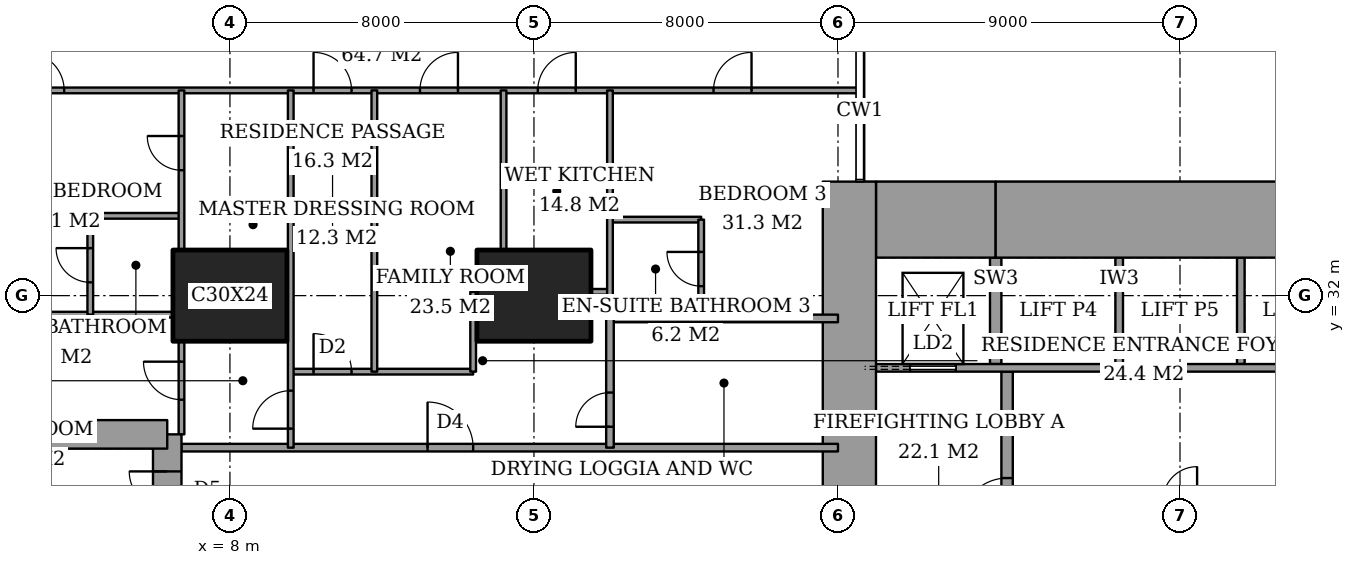
"""IFC4 building model, lengths in metres.
Left out: names, types, materials, properties, quantities, classifications, styles, units other than length and angle.
Written with IfcOpenShell. Run it as: python <this file> out.ifc"""

import sys

from ifc_helpers import new_model, si_unit, direction, frame, frame_2d, origin, origin_2d, place, context, subcontext, project, spatial, rectangle, extrude, element, fill, save


model = new_model("IFC4")
c1 = context("Model", 3, precision=1e-05, world=origin(), true_north=direction((0.0, 1.0)))
c2 = subcontext(c1, "Body", "Model", "MODEL_VIEW")
j1 = project(units=[si_unit("LENGTHUNIT", "METRE"), si_unit("PLANEANGLEUNIT", "RADIAN")], contexts=[c1])
p1 = place(None, origin())
s1 = spatial("IfcSite", under=j1, at=p1, CompositionType="ELEMENT")
p2 = place(p1, origin())
s2 = spatial("IfcBuilding", under=s1, at=p2, CompositionType="ELEMENT")
p3 = place(p2, frame((0.0, 0.0, 58.4)))
s3 = spatial("IfcBuildingStorey", under=s2, at=p3, CompositionType="ELEMENT", Elevation=58.4)
for number, where, z_axis, x_axis in (
    (1, (8.0, 32.0, 0.0), (0.0, 0.0, 1.0), (1.0, 0.0, 0.0)),
    (2, (16.0, 32.0, 0.0), (0.0, 0.0, 1.0), (1.0, 0.0, 0.0)),
):
    element("IfcColumn", number, at=place(p3, frame(where, z_axis=z_axis, x_axis=x_axis)), inside=s3, PredefinedType="COLUMN", context=c2, shape_type="SweptSolid", body=[
        extrude(rectangle(XDim=3.0, YDim=2.4, at=origin_2d()), origin(), (0.0, 0.0, 1.0), 3.6),
    ])
p4 = place(p3, frame((25.0, 34.0, 0.0), z_axis=(0.0, 0.0, 1.0), x_axis=(1.0, 0.0, 0.0)))
e3 = element("IfcWall", 3, at=p4, inside=s3, PredefinedType="SHEAR", context=c2, shape_type="SweptSolid", body=[
    extrude(rectangle(XDim=3.15, YDim=2.0, at=frame_2d((1.575, 0.0))), origin(), (0.0, 0.0, 1.0), 3.6),
])
p5 = place(p3, frame((28.15, 34.0, 0.0), z_axis=(0.0, 0.0, 1.0), x_axis=(1.0, 0.0, 0.0)))
e4 = element("IfcWall", 4, at=p5, inside=s3, PredefinedType="SHEAR", context=c2, shape_type="SweptSolid", body=[
    extrude(rectangle(XDim=9.7, YDim=2.0, at=frame_2d((4.85, 0.0))), origin(), (0.0, 0.0, 1.0), 3.6),
])
p6 = place(p3, frame((24.3, 23.15, 0.0), z_axis=(0.0, 0.0, 1.0), x_axis=(0.0, 1.0, 0.0)))
e5 = element("IfcWall", 5, at=p6, inside=s3, PredefinedType="SHEAR", context=c2, shape_type="SweptSolid", body=[
    extrude(rectangle(XDim=11.85, YDim=1.4, at=frame_2d((5.925, 0.0))), origin(), (0.0, 0.0, 1.0), 3.6),
])
p7 = place(p6, frame((0.75, 0.0, 0.0)))
e6 = element("IfcOpeningElement", 6, at=p7, cuts=e5, PredefinedType="OPENING", context=c2, shape_type="SweptSolid", body=[
    extrude(rectangle(XDim=1.8, YDim=2.4, at=frame_2d((0.9, 1.2))), frame((0.0, 0.71, 0.0), z_axis=(0.0, -1.0, 0.0), x_axis=(1.0, 0.0, 0.0)), (0.0, 0.0, 1.0), 1.42),
])
p8 = place(p3, frame((28.45, 23.3, 0.0), z_axis=(0.0, 0.0, 1.0), x_axis=(0.0, 1.0, 0.0)))
e7 = element("IfcWall", 7, at=p8, inside=s3, PredefinedType="PARTITIONING", context=c2, shape_type="SweptSolid", body=[
    extrude(rectangle(XDim=6.7, YDim=0.3, at=frame_2d((3.35, 0.0))), origin(), (0.0, 0.0, 1.0), 3.6),
])
p9 = place(p8, frame((2.7, 0.0, 0.0)))
e8 = element("IfcOpeningElement", 8, at=p9, cuts=e7, PredefinedType="OPENING", context=c2, shape_type="SweptSolid", body=[
    extrude(rectangle(XDim=1.2, YDim=2.1, at=frame_2d((0.6, 1.05))), frame((0.0, 0.16, 0.0), z_axis=(0.0, -1.0, 0.0), x_axis=(1.0, 0.0, 0.0)), (0.0, 0.0, 1.0), 0.32),
])
p10 = place(p3, frame((6.35, 19.65, 0.0), z_axis=(0.0, 0.0, 1.0), x_axis=(0.0, 1.0, 0.0)))
e9 = element("IfcWall", 9, at=p10, inside=s3, PredefinedType="SHEAR", context=c2, shape_type="SweptSolid", body=[
    extrude(rectangle(XDim=8.7, YDim=0.75, at=frame_2d((4.35, 0.0))), origin(), (0.0, 0.0, 1.0), 3.6),
])
p11 = place(p10, frame((6.725, 0.0, 0.0)))
e10 = element("IfcOpeningElement", 10, at=p11, cuts=e9, PredefinedType="OPENING", context=c2, shape_type="SweptSolid", body=[
    extrude(rectangle(XDim=1.0, YDim=2.1, at=frame_2d((0.5, 1.05))), frame((0.0, 0.385, 0.0), z_axis=(0.0, -1.0, 0.0), x_axis=(1.0, 0.0, 0.0)), (0.0, 0.0, 1.0), 0.77),
])
p12 = place(p3, frame((6.35, 28.35, 0.0), z_axis=(0.0, 0.0, 1.0), x_axis=(-1.0, 0.0, 0.0)))
e11 = element("IfcWall", 11, at=p12, inside=s3, PredefinedType="SHEAR", context=c2, shape_type="SweptSolid", body=[
    extrude(rectangle(XDim=4.45, YDim=0.75, at=frame_2d((2.225, 0.0))), origin(), (0.0, 0.0, 1.0), 3.6),
])
p13 = place(p3, frame((6.725, 28.0, 0.0), z_axis=(0.0, 0.0, 1.0), x_axis=(1.0, 0.0, 0.0)))
e12 = element("IfcWall", 12, at=p13, inside=s3, PredefinedType="PARTITIONING", context=c2, shape_type="SweptSolid", body=[
    extrude(rectangle(XDim=17.275, YDim=0.2, at=frame_2d((8.637, 0.0))), origin(), (0.0, 0.0, 1.0), 3.35),
])
p14 = place(p13, frame((6.475, 0.0, 0.0)))
e13 = element("IfcOpeningElement", 13, at=p14, cuts=e12, PredefinedType="OPENING", context=c2, shape_type="SweptSolid", body=[
    extrude(rectangle(XDim=1.2, YDim=2.4, at=frame_2d((0.6, 1.2))), frame((0.0, 0.11, 0.0), z_axis=(0.0, -1.0, 0.0), x_axis=(1.0, 0.0, 0.0)), (0.0, 0.0, 1.0), 0.22),
])
p15 = place(p3, frame((9.6, 30.0, 0.0), z_axis=(0.0, 0.0, 1.0), x_axis=(1.0, 0.0, 0.0)))
e14 = element("IfcWall", 14, at=p15, inside=s3, PredefinedType="PARTITIONING", context=c2, shape_type="SweptSolid", body=[
    extrude(rectangle(XDim=4.8, YDim=0.15, at=frame_2d((2.4, 0.0))), origin(), (0.0, 0.0, 1.0), 3.35),
])
p16 = place(p15, frame((0.6, 0.0, 0.0)))
e15 = element("IfcOpeningElement", 15, at=p16, cuts=e14, PredefinedType="OPENING", context=c2, shape_type="SweptSolid", body=[
    extrude(rectangle(XDim=1.0, YDim=2.1, at=frame_2d((0.5, 1.05))), frame((0.0, 0.085, 0.0), z_axis=(0.0, -1.0, 0.0), x_axis=(1.0, 0.0, 0.0)), (0.0, 0.0, 1.0), 0.17),
])
p17 = place(p3, frame((18.0, 31.4, 0.0), z_axis=(0.0, 0.0, 1.0), x_axis=(1.0, 0.0, 0.0)))
e16 = element("IfcWall", 16, at=p17, inside=s3, PredefinedType="PARTITIONING", context=c2, shape_type="SweptSolid", body=[
    extrude(rectangle(XDim=6.0, YDim=0.2, at=frame_2d((3.0, 0.0))), origin(), (0.0, 0.0, 1.0), 3.35),
])
p18 = place(p3, frame((1.35, 31.5, 0.0), z_axis=(0.0, 0.0, 1.0), x_axis=(1.0, 0.0, 0.0)))
e17 = element("IfcWall", 17, at=p18, inside=s3, PredefinedType="PARTITIONING", context=c2, shape_type="SweptSolid", body=[
    extrude(rectangle(XDim=5.15, YDim=0.15, at=frame_2d((2.575, 0.0))), origin(), (0.0, 0.0, 1.0), 3.35),
])
p19 = place(p3, frame((17.5, 32.1, 0.0), z_axis=(0.0, 0.0, 1.0), x_axis=(1.0, 0.0, 0.0)))
e18 = element("IfcWall", 18, at=p19, inside=s3, PredefinedType="PARTITIONING", context=c2, shape_type="SweptSolid", body=[
    extrude(rectangle(XDim=0.5, YDim=0.15, at=frame_2d((0.25, 0.0))), origin(), (0.0, 0.0, 1.0), 2.634),
])
p20 = place(p3, frame((18.0, 34.0, 0.0), z_axis=(0.0, 0.0, 1.0), x_axis=(1.0, 0.0, 0.0)))
e19 = element("IfcWall", 19, at=p20, inside=s3, PredefinedType="PARTITIONING", context=c2, shape_type="SweptSolid", body=[
    extrude(rectangle(XDim=2.4, YDim=0.15, at=frame_2d((1.2, 0.0))), origin(), (0.0, 0.0, 1.0), 3.35),
])
p21 = place(p3, frame((4.325, 34.1, 0.0), z_axis=(0.0, 0.0, 1.0), x_axis=(1.0, 0.0, 0.0)))
e20 = element("IfcWall", 20, at=p21, inside=s3, PredefinedType="PARTITIONING", context=c2, shape_type="SweptSolid", body=[
    extrude(rectangle(XDim=2.4, YDim=0.15, at=frame_2d((1.2, 0.0))), origin(), (0.0, 0.0, 1.0), 3.35),
])
p22 = place(p3, frame((-0.45, 37.4, 0.0), z_axis=(0.0, 0.0, 1.0), x_axis=(1.0, 0.0, 0.0)))
e21 = element("IfcWall", 21, at=p22, inside=s3, PredefinedType="PARTITIONING", context=c2, shape_type="SweptSolid", body=[
    extrude(rectangle(XDim=25.011, YDim=0.15, at=frame_2d((12.505, 0.0))), origin(), (0.0, 0.0, 1.0), 3.35),
])
p23 = place(p22, frame((10.65, 0.0, 0.0)))
e22 = element("IfcOpeningElement", 22, at=p23, cuts=e21, PredefinedType="OPENING", context=c2, shape_type="SweptSolid", body=[
    extrude(rectangle(XDim=1.0, YDim=2.1, at=frame_2d((0.5, 1.05))), frame((0.0, 0.085, 0.0), z_axis=(0.0, -1.0, 0.0), x_axis=(1.0, 0.0, 0.0)), (0.0, 0.0, 1.0), 0.17),
])
p24 = place(p22, frame((3.087, 0.0, 0.0)))
e23 = element("IfcOpeningElement", 23, at=p24, cuts=e21, PredefinedType="OPENING", context=c2, shape_type="SweptSolid", body=[
    extrude(rectangle(XDim=1.0, YDim=2.1, at=frame_2d((0.5, 1.05))), frame((0.0, 0.085, 0.0), z_axis=(0.0, -1.0, 0.0), x_axis=(1.0, 0.0, 0.0)), (0.0, 0.0, 1.0), 0.17),
])
p25 = place(p22, frame((13.45, 0.0, 0.0)))
e24 = element("IfcOpeningElement", 24, at=p25, cuts=e21, PredefinedType="OPENING", context=c2, shape_type="SweptSolid", body=[
    extrude(rectangle(XDim=1.0, YDim=2.1, at=frame_2d((0.5, 1.05))), frame((0.0, 0.085, 0.0), z_axis=(0.0, -1.0, 0.0), x_axis=(1.0, 0.0, 0.0)), (0.0, 0.0, 1.0), 0.17),
])
p26 = place(p22, frame((16.55, 0.0, 0.0)))
e25 = element("IfcOpeningElement", 25, at=p26, cuts=e21, PredefinedType="OPENING", context=c2, shape_type="SweptSolid", body=[
    extrude(rectangle(XDim=1.0, YDim=2.1, at=frame_2d((0.5, 1.05))), frame((0.0, 0.085, 0.0), z_axis=(0.0, -1.0, 0.0), x_axis=(1.0, 0.0, 0.0)), (0.0, 0.0, 1.0), 0.17),
])
p27 = place(p22, frame((21.175, 0.0, 0.0)))
e26 = element("IfcOpeningElement", 26, at=p27, cuts=e21, PredefinedType="OPENING", context=c2, shape_type="SweptSolid", body=[
    extrude(rectangle(XDim=1.0, YDim=2.1, at=frame_2d((0.5, 1.05))), frame((0.0, 0.085, 0.0), z_axis=(0.0, -1.0, 0.0), x_axis=(1.0, 0.0, 0.0)), (0.0, 0.0, 1.0), 0.17),
])
p28 = place(p3, frame((4.325, 31.5, 0.0), z_axis=(0.0, 0.0, 1.0), x_axis=(0.0, 1.0, 0.0)))
e27 = element("IfcWall", 27, at=p28, inside=s3, PredefinedType="PARTITIONING", context=c2, shape_type="SweptSolid", body=[
    extrude(rectangle(XDim=2.6, YDim=0.15, at=frame_2d((1.3, 0.0))), origin(), (0.0, 0.0, 1.0), 3.35),
])
p29 = place(p28, frame((0.85, 0.0, 0.0)))
e28 = element("IfcOpeningElement", 28, at=p29, cuts=e27, PredefinedType="OPENING", context=c2, shape_type="SweptSolid", body=[
    extrude(rectangle(XDim=0.9, YDim=2.1, at=frame_2d((0.45, 1.05))), frame((0.0, 0.085, 0.0), z_axis=(0.0, -1.0, 0.0), x_axis=(1.0, 0.0, 0.0)), (0.0, 0.0, 1.0), 0.17),
])
p30 = place(p3, frame((6.725, 28.35, 0.0), z_axis=(0.0, 0.0, 1.0), x_axis=(0.0, 1.0, 0.0)))
e29 = element("IfcWall", 29, at=p30, inside=s3, PredefinedType="PARTITIONING", context=c2, shape_type="SweptSolid", body=[
    extrude(rectangle(XDim=2.45, YDim=0.15, at=frame_2d((1.225, 0.0))), origin(), (0.0, 0.0, 1.0), 3.35),
])
p31 = place(p30, frame((0.913, 0.0, 0.0)))
e30 = element("IfcOpeningElement", 30, at=p31, cuts=e29, PredefinedType="OPENING", context=c2, shape_type="SweptSolid", body=[
    extrude(rectangle(XDim=1.0, YDim=2.1, at=frame_2d((0.5, 1.05))), frame((0.0, 0.085, 0.0), z_axis=(0.0, -1.0, 0.0), x_axis=(1.0, 0.0, 0.0)), (0.0, 0.0, 1.0), 0.17),
])
p32 = place(p3, frame((6.725, 33.2, 0.0), z_axis=(0.0, 0.0, 1.0), x_axis=(0.0, 1.0, 0.0)))
e31 = element("IfcWall", 31, at=p32, inside=s3, PredefinedType="PARTITIONING", context=c2, shape_type="SweptSolid", body=[
    extrude(rectangle(XDim=4.2, YDim=0.15, at=frame_2d((2.1, 0.0))), origin(), (0.0, 0.0, 1.0), 3.35),
])
p33 = place(p32, frame((2.1, 0.0, 0.0)))
e32 = element("IfcOpeningElement", 32, at=p33, cuts=e31, PredefinedType="OPENING", context=c2, shape_type="SweptSolid", body=[
    extrude(rectangle(XDim=0.9, YDim=2.1, at=frame_2d((0.45, 1.05))), frame((0.0, 0.085, 0.0), z_axis=(0.0, -1.0, 0.0), x_axis=(1.0, 0.0, 0.0)), (0.0, 0.0, 1.0), 0.17),
])
p34 = place(p3, frame((9.6, 28.0, 0.0), z_axis=(0.0, 0.0, 1.0), x_axis=(0.0, 1.0, 0.0)))
e33 = element("IfcWall", 33, at=p34, inside=s3, PredefinedType="PARTITIONING", context=c2, shape_type="SweptSolid", body=[
    extrude(rectangle(XDim=9.4, YDim=0.15, at=frame_2d((4.7, 0.0))), origin(), (0.0, 0.0, 1.0), 3.35),
])
p35 = place(p34, frame((0.5, 0.0, 0.0)))
e34 = element("IfcOpeningElement", 34, at=p35, cuts=e33, PredefinedType="OPENING", context=c2, shape_type="SweptSolid", body=[
    extrude(rectangle(XDim=1.0, YDim=2.1, at=frame_2d((0.5, 1.05))), frame((0.0, 0.085, 0.0), z_axis=(0.0, -1.0, 0.0), x_axis=(1.0, 0.0, 0.0)), (0.0, 0.0, 1.0), 0.17),
])
p36 = place(p3, frame((11.8, 30.0, 0.0), z_axis=(0.0, 0.0, 1.0), x_axis=(0.0, 1.0, 0.0)))
e35 = element("IfcWall", 35, at=p36, inside=s3, PredefinedType="PARTITIONING", context=c2, shape_type="SweptSolid", body=[
    extrude(rectangle(XDim=7.4, YDim=0.15, at=frame_2d((3.7, 0.0))), origin(), (0.0, 0.0, 1.0), 3.35),
])
p37 = place(p3, frame((14.4, 30.0, 0.0), z_axis=(0.0, 0.0, 1.0), x_axis=(0.0, 1.0, 0.0)))
e36 = element("IfcWall", 36, at=p37, inside=s3, PredefinedType="PARTITIONING", context=c2, shape_type="SweptSolid", body=[
    extrude(rectangle(XDim=2.1, YDim=0.15, at=frame_2d((1.05, 0.0))), origin(), (0.0, 0.0, 1.0), 3.35),
])
p38 = place(p3, frame((15.2, 33.2, 0.0), z_axis=(0.0, 0.0, 1.0), x_axis=(0.0, 1.0, 0.0)))
e37 = element("IfcWall", 37, at=p38, inside=s3, PredefinedType="PARTITIONING", context=c2, shape_type="SweptSolid", body=[
    extrude(rectangle(XDim=4.2, YDim=0.15, at=frame_2d((2.1, 0.0))), origin(), (0.0, 0.0, 1.0), 3.35),
])
p39 = place(p3, frame((18.0, 28.0, 0.0), z_axis=(0.0, 0.0, 1.0), x_axis=(0.0, 1.0, 0.0)))
e38 = element("IfcWall", 38, at=p39, inside=s3, PredefinedType="PARTITIONING", context=c2, shape_type="SweptSolid", body=[
    extrude(rectangle(XDim=3.4, YDim=0.2, at=frame_2d((1.7, 0.0))), origin(), (0.0, 0.0, 1.0), 3.35),
])
p40 = place(p39, frame((0.55, 0.0, 0.0)))
e39 = element("IfcOpeningElement", 39, at=p40, cuts=e38, PredefinedType="OPENING", context=c2, shape_type="SweptSolid", body=[
    extrude(rectangle(XDim=0.9, YDim=2.1, at=frame_2d((0.45, 1.05))), frame((0.0, 0.11, 0.0), z_axis=(0.0, -1.0, 0.0), x_axis=(1.0, 0.0, 0.0)), (0.0, 0.0, 1.0), 0.22),
])
p41 = place(p3, frame((18.0, 31.4, 0.0), z_axis=(0.0, 0.0, 1.0), x_axis=(0.0, 1.0, 0.0)))
e40 = element("IfcWall", 40, at=p41, inside=s3, PredefinedType="PARTITIONING", context=c2, shape_type="SweptSolid", body=[
    extrude(rectangle(XDim=6.0, YDim=0.15, at=frame_2d((3.0, 0.0))), origin(), (0.0, 0.0, 1.0), 3.35),
])
p42 = place(p3, frame((20.4, 31.4, 0.0), z_axis=(0.0, 0.0, 1.0), x_axis=(0.0, 1.0, 0.0)))
e41 = element("IfcWall", 41, at=p42, inside=s3, PredefinedType="PARTITIONING", context=c2, shape_type="SweptSolid", body=[
    extrude(rectangle(XDim=2.6, YDim=0.15, at=frame_2d((1.3, 0.0))), origin(), (0.0, 0.0, 1.0), 3.35),
])
p43 = place(p42, frame((0.85, 0.0, 0.0)))
e42 = element("IfcOpeningElement", 42, at=p43, cuts=e41, PredefinedType="OPENING", context=c2, shape_type="SweptSolid", body=[
    extrude(rectangle(XDim=0.9, YDim=2.1, at=frame_2d((0.45, 1.05))), frame((0.0, 0.085, 0.0), z_axis=(0.0, -1.0, 0.0), x_axis=(1.0, 0.0, 0.0)), (0.0, 0.0, 1.0), 0.17),
])
p44 = place(p3, frame((25.0, 30.1, 0.0), z_axis=(0.0, 0.0, 1.0), x_axis=(1.0, 0.0, 0.0)))
e43 = element("IfcWall", 43, at=p44, inside=s3, PredefinedType="PARTITIONING", context=c2, shape_type="SweptSolid", body=[
    extrude(rectangle(XDim=12.7, YDim=0.2, at=frame_2d((6.35, 0.0))), origin(), (0.0, 0.0, 1.0), 3.6),
])
p45 = place(p44, frame((0.9, 0.0, 0.0)))
e44 = element("IfcOpeningElement", 44, at=p45, cuts=e43, PredefinedType="OPENING", context=c2, shape_type="SweptSolid", body=[
    extrude(rectangle(XDim=1.2, YDim=2.1, at=frame_2d((0.6, 1.05))), frame((0.0, 0.11, 0.0), z_axis=(0.0, -1.0, 0.0), x_axis=(1.0, 0.0, 0.0)), (0.0, 0.0, 1.0), 0.22),
])
for number, where, z_axis, x_axis in (
    (45, (31.4, 30.2, 0.0), (0.0, 0.0, 1.0), (0.0, 1.0, 0.0)),
    (46, (34.6, 30.2, 0.0), (0.0, 0.0, 1.0), (0.0, 1.0, 0.0)),
):
    element("IfcWall", number, at=place(p3, frame(where, z_axis=z_axis, x_axis=x_axis)), inside=s3, PredefinedType="PARTITIONING", context=c2, shape_type="SweptSolid", body=[
        extrude(rectangle(XDim=2.8, YDim=0.2, at=frame_2d((1.4, 0.0))), origin(), (0.0, 0.0, 1.0), 3.6),
    ])
p46 = place(p3, frame((28.15, 30.2, 0.0), z_axis=(0.0, 0.0, 1.0), x_axis=(0.0, 1.0, 0.0)))
e47 = element("IfcWall", 47, at=p46, inside=s3, PredefinedType="SHEAR", context=c2, shape_type="SweptSolid", body=[
    extrude(rectangle(XDim=2.8, YDim=0.3, at=frame_2d((1.4, 0.0))), origin(), (0.0, 0.0, 1.0), 3.6),
])
p47 = place(p23, origin())
e48 = element("IfcDoor", 48, at=p47, inside=s3, OperationType="SINGLE_SWING_RIGHT", PredefinedType="DOOR", context=c2, shape_type="SweptSolid", body=[
    extrude(rectangle(XDim=1.0, YDim=2.1, at=frame_2d((0.5, 1.05))), frame((0.0, 0.025, 0.0), z_axis=(0.0, -1.0, 0.0), x_axis=(1.0, 0.0, 0.0)), (0.0, 0.0, 1.0), 0.05),
])
fill(e22, e48)
p48 = place(p29, origin())
e49 = element("IfcDoor", 49, at=p48, inside=s3, OperationType="SINGLE_SWING_LEFT", PredefinedType="DOOR", context=c2, shape_type="SweptSolid", body=[
    extrude(rectangle(XDim=0.9, YDim=2.1, at=frame_2d((0.45, 1.05))), frame((0.0, 0.025, 0.0), z_axis=(0.0, -1.0, 0.0), x_axis=(1.0, 0.0, 0.0)), (0.0, 0.0, 1.0), 0.05),
])
fill(e28, e49)
p49 = place(p24, origin())
e50 = element("IfcDoor", 50, at=p49, inside=s3, OperationType="SINGLE_SWING_RIGHT", PredefinedType="DOOR", context=c2, shape_type="SweptSolid", body=[
    extrude(rectangle(XDim=1.0, YDim=2.1, at=frame_2d((0.5, 1.05))), frame((0.0, 0.025, 0.0), z_axis=(0.0, -1.0, 0.0), x_axis=(1.0, 0.0, 0.0)), (0.0, 0.0, 1.0), 0.05),
])
fill(e23, e50)
p50 = place(p31, origin())
e51 = element("IfcDoor", 51, at=p50, inside=s3, OperationType="SINGLE_SWING_LEFT", PredefinedType="DOOR", context=c2, shape_type="SweptSolid", body=[
    extrude(rectangle(XDim=1.0, YDim=2.1, at=frame_2d((0.5, 1.05))), frame((0.0, 0.025, 0.0), z_axis=(0.0, -1.0, 0.0), x_axis=(1.0, 0.0, 0.0)), (0.0, 0.0, 1.0), 0.05),
])
fill(e30, e51)
p51 = place(p33, origin())
e52 = element("IfcDoor", 52, at=p51, inside=s3, OperationType="SINGLE_SWING_LEFT", PredefinedType="DOOR", context=c2, shape_type="SweptSolid", body=[
    extrude(rectangle(XDim=0.9, YDim=2.1, at=frame_2d((0.45, 1.05))), frame((0.0, 0.025, 0.0), z_axis=(0.0, -1.0, 0.0), x_axis=(1.0, 0.0, 0.0)), (0.0, 0.0, 1.0), 0.05),
])
fill(e32, e52)
p52 = place(p35, origin())
e53 = element("IfcDoor", 53, at=p52, inside=s3, OperationType="SINGLE_SWING_RIGHT", PredefinedType="DOOR", context=c2, shape_type="SweptSolid", body=[
    extrude(rectangle(XDim=1.0, YDim=2.1, at=frame_2d((0.5, 1.05))), frame((0.0, 0.025, 0.0), z_axis=(0.0, -1.0, 0.0), x_axis=(1.0, 0.0, 0.0)), (0.0, 0.0, 1.0), 0.05),
])
fill(e34, e53)
p53 = place(p14, origin())
e54 = element("IfcDoor", 54, at=p53, inside=s3, OperationType="SINGLE_SWING_RIGHT", PredefinedType="DOOR", context=c2, shape_type="SweptSolid", body=[
    extrude(rectangle(XDim=1.2, YDim=2.4, at=frame_2d((0.6, 1.2))), frame((0.0, 0.025, 0.0), z_axis=(0.0, -1.0, 0.0), x_axis=(1.0, 0.0, 0.0)), (0.0, 0.0, 1.0), 0.05),
])
fill(e13, e54)
p54 = place(p16, origin())
e55 = element("IfcDoor", 55, at=p54, inside=s3, OperationType="SINGLE_SWING_RIGHT", PredefinedType="DOOR", context=c2, shape_type="SweptSolid", body=[
    extrude(rectangle(XDim=1.0, YDim=2.1, at=frame_2d((0.5, 1.05))), frame((0.0, 0.025, 0.0), z_axis=(0.0, -1.0, 0.0), x_axis=(1.0, 0.0, 0.0)), (0.0, 0.0, 1.0), 0.05),
])
fill(e15, e55)
p55 = place(p25, origin())
e56 = element("IfcDoor", 56, at=p55, inside=s3, OperationType="SINGLE_SWING_LEFT", PredefinedType="DOOR", context=c2, shape_type="SweptSolid", body=[
    extrude(rectangle(XDim=1.0, YDim=2.1, at=frame_2d((0.5, 1.05))), frame((0.0, 0.025, 0.0), z_axis=(0.0, -1.0, 0.0), x_axis=(1.0, 0.0, 0.0)), (0.0, 0.0, 1.0), 0.05),
])
fill(e24, e56)
p56 = place(p26, origin())
e57 = element("IfcDoor", 57, at=p56, inside=s3, OperationType="SINGLE_SWING_LEFT", PredefinedType="DOOR", context=c2, shape_type="SweptSolid", body=[
    extrude(rectangle(XDim=1.0, YDim=2.1, at=frame_2d((0.5, 1.05))), frame((0.0, 0.025, 0.0), z_axis=(0.0, -1.0, 0.0), x_axis=(1.0, 0.0, 0.0)), (0.0, 0.0, 1.0), 0.05),
])
fill(e25, e57)
p57 = place(p43, origin())
e58 = element("IfcDoor", 58, at=p57, inside=s3, OperationType="SINGLE_SWING_LEFT", PredefinedType="DOOR", context=c2, shape_type="SweptSolid", body=[
    extrude(rectangle(XDim=0.9, YDim=2.1, at=frame_2d((0.45, 1.05))), frame((0.0, 0.025, 0.0), z_axis=(0.0, -1.0, 0.0), x_axis=(1.0, 0.0, 0.0)), (0.0, 0.0, 1.0), 0.05),
])
fill(e42, e58)
p58 = place(p27, origin())
e59 = element("IfcDoor", 59, at=p58, inside=s3, OperationType="SINGLE_SWING_LEFT", PredefinedType="DOOR", context=c2, shape_type="SweptSolid", body=[
    extrude(rectangle(XDim=1.0, YDim=2.1, at=frame_2d((0.5, 1.05))), frame((0.0, 0.025, 0.0), z_axis=(0.0, -1.0, 0.0), x_axis=(1.0, 0.0, 0.0)), (0.0, 0.0, 1.0), 0.05),
])
fill(e26, e59)
p59 = place(p40, origin())
e60 = element("IfcDoor", 60, at=p59, inside=s3, OperationType="SINGLE_SWING_RIGHT", PredefinedType="DOOR", context=c2, shape_type="SweptSolid", body=[
    extrude(rectangle(XDim=0.9, YDim=2.1, at=frame_2d((0.45, 1.05))), frame((0.0, 0.025, 0.0), z_axis=(0.0, -1.0, 0.0), x_axis=(1.0, 0.0, 0.0)), (0.0, 0.0, 1.0), 0.05),
])
fill(e39, e60)
p60 = place(p9, origin())
e61 = element("IfcDoor", 61, at=p60, inside=s3, OperationType="SINGLE_SWING_RIGHT", PredefinedType="DOOR", context=c2, shape_type="SweptSolid", body=[
    extrude(rectangle(XDim=1.2, YDim=2.1, at=frame_2d((0.6, 1.05))), frame((0.0, 0.025, 0.0), z_axis=(0.0, -1.0, 0.0), x_axis=(1.0, 0.0, 0.0)), (0.0, 0.0, 1.0), 0.05),
])
fill(e8, e61)
p61 = place(p45, origin())
e62 = element("IfcDoor", 62, at=p61, inside=s3, OperationType="SLIDING_TO_LEFT", PredefinedType="DOOR", context=c2, shape_type="SweptSolid", body=[
    extrude(rectangle(XDim=1.2, YDim=2.1, at=frame_2d((0.6, 1.05))), frame((0.0, 0.025, 0.0), z_axis=(0.0, -1.0, 0.0), x_axis=(1.0, 0.0, 0.0)), (0.0, 0.0, 1.0), 0.05),
])
fill(e44, e62)
p62 = place(p11, origin())
e63 = element("IfcDoor", 63, at=p62, inside=s3, OperationType="SINGLE_SWING_LEFT", PredefinedType="DOOR", context=c2, shape_type="SweptSolid", body=[
    extrude(rectangle(XDim=1.0, YDim=2.1, at=frame_2d((0.5, 1.05))), frame((0.0, 0.025, 0.0), z_axis=(0.0, -1.0, 0.0), x_axis=(1.0, 0.0, 0.0)), (0.0, 0.0, 1.0), 0.05),
])
fill(e10, e63)
save(model, sys.argv[1])
